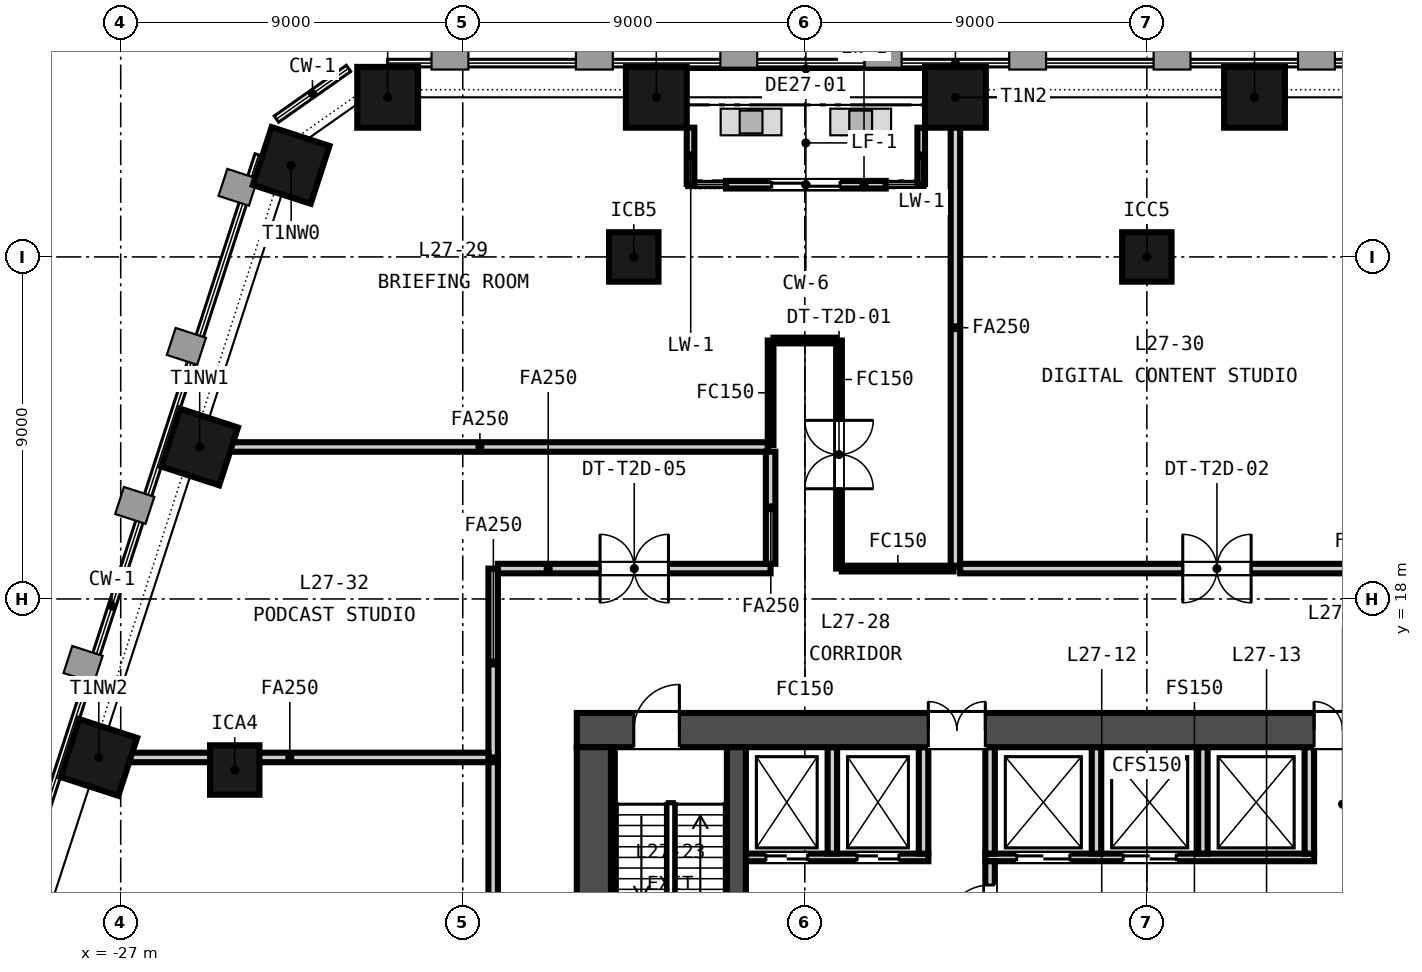
"""IFC4 building model, lengths in metres.
Left out: names, types, materials, properties, quantities, classifications, styles, units other than length and angle.
Written with IfcOpenShell. Run it as: python <this file> out.ifc"""

import sys

from ifc_helpers import new_model, si_unit, direction, frame, frame_2d, origin, origin_2d, place, context, subcontext, project, spatial, rectangle, extrude, element, fill, save


model = new_model("IFC4")
c1 = context("Model", 3, precision=1e-05, world=origin(), true_north=direction((0.0, 1.0)))
c2 = subcontext(c1, "Body", "Model", "MODEL_VIEW")
j1 = project(units=[si_unit("LENGTHUNIT", "METRE"), si_unit("PLANEANGLEUNIT", "RADIAN")], contexts=[c1])
p1 = place(None, origin())
s1 = spatial("IfcSite", under=j1, at=p1, CompositionType="ELEMENT")
p2 = place(p1, origin())
s2 = spatial("IfcBuilding", under=s1, at=p2, CompositionType="ELEMENT")
p3 = place(p2, frame((0.0, 0.0, 113.5)))
s3 = spatial("IfcBuildingStorey", under=s2, at=p3, CompositionType="ELEMENT", Elevation=113.5)
p4 = place(p3, frame((-15.0, 14.55, -0.15), z_axis=(0.0, 0.0, 1.0), x_axis=(1.0, 0.0, 0.0)))
e1 = element("IfcWall", 1, at=p4, inside=s3, PredefinedType="SOLIDWALL", context=c2, shape_type="SweptSolid", body=[
    extrude(rectangle(XDim=30.0, YDim=0.9, at=frame_2d((15.0, 0.0))), origin(), (0.0, 0.0, 1.0), 3.5),
])
p5 = place(p4, frame((9.25, 0.0, 0.15)))
e2 = element("IfcOpeningElement", 2, at=p5, cuts=e1, PredefinedType="OPENING", context=c2, shape_type="SweptSolid", body=[
    extrude(rectangle(XDim=1.5, YDim=2.1, at=frame_2d((0.75, 1.05))), frame((0.0, 0.46, 0.0), z_axis=(0.0, -1.0, 0.0), x_axis=(1.0, 0.0, 0.0)), (0.0, 0.0, 1.0), 0.92),
])
p6 = place(p4, frame((19.4, 0.0, 0.15)))
e3 = element("IfcOpeningElement", 3, at=p6, cuts=e1, PredefinedType="OPENING", context=c2, shape_type="SweptSolid", body=[
    extrude(rectangle(XDim=1.5, YDim=2.1, at=frame_2d((0.75, 1.05))), frame((0.0, 0.46, 0.0), z_axis=(0.0, -1.0, 0.0), x_axis=(1.0, 0.0, 0.0)), (0.0, 0.0, 1.0), 0.92),
])
p7 = place(p4, frame((1.5, 0.0, 0.15)))
e4 = element("IfcOpeningElement", 4, at=p7, cuts=e1, PredefinedType="OPENING", context=c2, shape_type="SweptSolid", body=[
    extrude(rectangle(XDim=1.2, YDim=2.1, at=frame_2d((0.6, 1.05))), frame((0.0, 0.46, 0.0), z_axis=(0.0, -1.0, 0.0), x_axis=(1.0, 0.0, 0.0)), (0.0, 0.0, 1.0), 0.92),
])
p8 = place(p4, frame((27.3, 0.0, 0.15)))
e5 = element("IfcOpeningElement", 5, at=p8, cuts=e1, PredefinedType="OPENING", context=c2, shape_type="SweptSolid", body=[
    extrude(rectangle(XDim=1.2, YDim=2.1, at=frame_2d((0.6, 1.05))), frame((0.0, 0.46, 0.0), z_axis=(0.0, -1.0, 0.0), x_axis=(1.0, 0.0, 0.0)), (0.0, 0.0, 1.0), 0.92),
])
p9 = place(p3, frame((-14.55, 0.9, -0.15), z_axis=(0.0, 0.0, 1.0), x_axis=(0.0, 1.0, 0.0)))
e6 = element("IfcWall", 6, at=p9, inside=s3, PredefinedType="SOLIDWALL", context=c2, shape_type="SweptSolid", body=[
    extrude(rectangle(XDim=13.2, YDim=0.9, at=frame_2d((6.6, 0.0))), origin(), (0.0, 0.0, 1.0), 3.5),
])
p10 = place(p3, frame((-10.8, 0.9, -0.15), z_axis=(0.0, 0.0, 1.0), x_axis=(0.0, 1.0, 0.0)))
e7 = element("IfcWall", 7, at=p10, inside=s3, PredefinedType="SOLIDWALL", context=c2, shape_type="SweptSolid", body=[
    extrude(rectangle(XDim=13.2, YDim=0.5, at=frame_2d((6.6, 0.0))), origin(), (0.0, 0.0, 1.0), 3.5),
])
for number, where, z_axis, x_axis in (
    (8, (2.832, 31.2, -0.15), (0.0, 0.0, 1.0), (-1.0, 0.0, 0.0)),
    (9, (-5.037, 31.2, -0.15), (0.0, 0.0, 1.0), (-1.0, 0.0, 0.0)),
    (10, (-12.907, 31.2, -0.15), (0.0, 0.0, 1.0), (-1.0, 0.0, 0.0)),
    (11, (-19.976, 31.2, -0.15), (0.0, 0.0, 1.0), (-1.0, 0.0, 0.0)),
    (12, (-22.515, 29.407, -0.15), (0.0, 0.0, 1.0), (-0.309, -0.951, 0.0)),
    (13, (-24.923, 21.999, -0.15), (0.0, 0.0, 1.0), (-0.309, -0.951, 0.0)),
    (14, (-27.577, 13.83, -0.15), (0.0, 0.0, 1.0), (-0.309, -0.951, 0.0)),
):
    element("IfcColumn", number, at=place(p3, frame(where, z_axis=z_axis, x_axis=x_axis)), inside=s3, PredefinedType="COLUMN", context=c2, shape_type="SweptSolid", body=[
        extrude(rectangle(XDim=1.6, YDim=1.6, at=origin_2d()), origin(), (0.0, 0.0, 1.0), 3.5),
    ])
for number, where, z_axis, x_axis in (
    (15, (-24.0, 13.5, -0.15), (0.0, 0.0, 1.0), (1.0, 0.0, 0.0)),
    (16, (-13.5, 27.0, -0.15), (0.0, 0.0, 1.0), (1.0, 0.0, 0.0)),
    (17, (0.0, 27.0, -0.15), (0.0, 0.0, 1.0), (1.0, 0.0, 0.0)),
):
    element("IfcColumn", number, at=place(p3, frame(where, z_axis=z_axis, x_axis=x_axis)), inside=s3, PredefinedType="COLUMN", context=c2, shape_type="SweptSolid", body=[
        extrude(rectangle(XDim=1.3, YDim=1.3, at=origin_2d()), origin(), (0.0, 0.0, 1.0), 3.5),
    ])
p11 = place(p3, frame((-6.872, 28.9, 0.0), z_axis=(0.0, 0.0, 1.0), x_axis=(-1.0, 0.0, 0.0)))
e18 = element("IfcWall", 18, at=p11, inside=s3, PredefinedType="SOLIDWALL", context=c2, shape_type="SweptSolid", body=[
    extrude(rectangle(XDim=4.2, YDim=0.2, at=frame_2d((2.1, 0.0))), origin(), (0.0, 0.0, 1.0), 2.9),
])
p12 = place(p11, frame((1.2, 0.0, 0.0)))
e19 = element("IfcOpeningElement", 19, at=p12, cuts=e18, PredefinedType="OPENING", context=c2, shape_type="SweptSolid", body=[
    extrude(rectangle(XDim=1.8, YDim=2.4, at=frame_2d((0.9, 1.2))), frame((0.0, 0.11, 0.0), z_axis=(0.0, -1.0, 0.0), x_axis=(1.0, 0.0, 0.0)), (0.0, 0.0, 1.0), 0.22),
])
for number, where, z_axis, x_axis in (
    (20, (-5.937, 30.4, 0.0), (0.0, 0.0, 1.0), (0.0, -1.0, 0.0)),
    (21, (-12.007, 30.4, 0.0), (0.0, 0.0, 1.0), (0.0, -1.0, 0.0)),
):
    element("IfcWall", number, at=place(p3, frame(where, z_axis=z_axis, x_axis=x_axis)), inside=s3, PredefinedType="SOLIDWALL", context=c2, shape_type="SweptSolid", body=[
        extrude(rectangle(XDim=1.484, YDim=0.2, at=frame_2d((0.742, 0.0))), origin(), (0.0, 0.0, 1.0), 2.9),
    ])
p13 = place(p3, frame((-10.55, 11.2, 0.0), z_axis=(0.0, 0.0, 1.0), x_axis=(1.0, 0.0, 0.0)))
e22 = element("IfcWall", 22, at=p13, inside=s3, PredefinedType="PARTITIONING", context=c2, shape_type="SweptSolid", body=[
    extrude(rectangle(XDim=4.8, YDim=0.2, at=frame_2d((2.4, 0.0))), origin(), (0.0, 0.0, 1.0), 3.35),
])
p14 = place(p13, frame((0.525, 0.0, 0.0)))
e23 = element("IfcOpeningElement", 23, at=p14, cuts=e22, PredefinedType="OPENING", context=c2, shape_type="SweptSolid", body=[
    extrude(rectangle(XDim=1.1, YDim=2.1, at=frame_2d((0.55, 1.05))), frame((0.0, 0.11, 0.0), z_axis=(0.0, -1.0, 0.0), x_axis=(1.0, 0.0, 0.0)), (0.0, 0.0, 1.0), 0.22),
])
p15 = place(p13, frame((2.925, 0.0, 0.0)))
e24 = element("IfcOpeningElement", 24, at=p15, cuts=e22, PredefinedType="OPENING", context=c2, shape_type="SweptSolid", body=[
    extrude(rectangle(XDim=1.1, YDim=2.1, at=frame_2d((0.55, 1.05))), frame((0.0, 0.11, 0.0), z_axis=(0.0, -1.0, 0.0), x_axis=(1.0, 0.0, 0.0)), (0.0, 0.0, 1.0), 0.22),
])
p16 = place(p3, frame((-4.25, 11.2, 0.0), z_axis=(0.0, 0.0, 1.0), x_axis=(1.0, 0.0, 0.0)))
e25 = element("IfcWall", 25, at=p16, inside=s3, PredefinedType="PARTITIONING", context=c2, shape_type="SweptSolid", body=[
    extrude(rectangle(XDim=8.65, YDim=0.2, at=frame_2d((4.325, 0.0))), origin(), (0.0, 0.0, 1.0), 3.35),
])
p17 = place(p16, frame((0.825, 0.0, 0.0)))
e26 = element("IfcOpeningElement", 26, at=p17, cuts=e25, PredefinedType="OPENING", context=c2, shape_type="SweptSolid", body=[
    extrude(rectangle(XDim=1.4, YDim=2.1, at=frame_2d((0.7, 1.05))), frame((0.0, 0.11, 0.0), z_axis=(0.0, -1.0, 0.0), x_axis=(1.0, 0.0, 0.0)), (0.0, 0.0, 1.0), 0.22),
])
p18 = place(p16, frame((3.625, 0.0, 0.0)))
e27 = element("IfcOpeningElement", 27, at=p18, cuts=e25, PredefinedType="OPENING", context=c2, shape_type="SweptSolid", body=[
    extrude(rectangle(XDim=1.4, YDim=2.1, at=frame_2d((0.7, 1.05))), frame((0.0, 0.11, 0.0), z_axis=(0.0, -1.0, 0.0), x_axis=(1.0, 0.0, 0.0)), (0.0, 0.0, 1.0), 0.22),
])
p19 = place(p3, frame((-4.125, 6.15, 0.0), z_axis=(0.0, 0.0, 1.0), x_axis=(0.0, 1.0, 0.0)))
e28 = element("IfcWall", 28, at=p19, inside=s3, PredefinedType="PARTITIONING", context=c2, shape_type="SweptSolid", body=[
    extrude(rectangle(XDim=4.95, YDim=0.25, at=frame_2d((2.475, 0.0))), origin(), (0.0, 0.0, 1.0), 3.35),
])
p20 = place(p19, frame((3.125, 0.0, 0.0)))
e29 = element("IfcOpeningElement", 29, at=p20, cuts=e28, PredefinedType="OPENING", context=c2, shape_type="SweptSolid", body=[
    extrude(rectangle(XDim=1.2, YDim=2.1, at=frame_2d((0.6, 1.05))), frame((0.0, 0.135, 0.0), z_axis=(0.0, -1.0, 0.0), x_axis=(1.0, 0.0, 0.0)), (0.0, 0.0, 1.0), 0.27),
])
for number, where, z_axis, x_axis in (
    (30, (-8.275, 11.3, 0.0), (0.0, 0.0, 1.0), (0.0, 1.0, 0.0)),
    (31, (-5.875, 11.3, 0.0), (0.0, 0.0, 1.0), (0.0, 1.0, 0.0)),
    (32, (-4.125, 11.3, 0.0), (0.0, 0.0, 1.0), (0.0, 1.0, 0.0)),
    (33, (-1.325, 11.3, 0.0), (0.0, 0.0, 1.0), (0.0, 1.0, 0.0)),
    (34, (1.475, 11.3, 0.0), (0.0, 0.0, 1.0), (0.0, 1.0, 0.0)),
    (35, (4.275, 11.3, 0.0), (0.0, 0.0, 1.0), (0.0, 1.0, 0.0)),
):
    element("IfcWall", number, at=place(p3, frame(where, z_axis=z_axis, x_axis=x_axis)), inside=s3, PredefinedType="PARTITIONING", context=c2, shape_type="SweptSolid", body=[
        extrude(rectangle(XDim=2.8, YDim=0.25, at=frame_2d((1.4, 0.0))), origin(), (0.0, 0.0, 1.0), 3.35),
    ])
p21 = place(p3, frame((-14.05, 0.9, 0.0), z_axis=(0.0, 0.0, 1.0), x_axis=(0.0, 1.0, 0.0)))
e36 = element("IfcWall", 36, at=p21, inside=s3, PredefinedType="SOLIDWALL", context=c2, shape_type="SweptSolid", body=[
    extrude(rectangle(XDim=13.2, YDim=0.1, at=frame_2d((6.6, 0.0))), origin(), (0.0, 0.0, 1.0), 3.35),
])
p22 = place(p3, frame((-8.1, 24.8, 0.0), z_axis=(0.0, 0.0, 1.0), x_axis=(0.0, -1.0, 0.0)))
e37 = element("IfcWall", 37, at=p22, inside=s3, PredefinedType="PARTITIONING", context=c2, shape_type="SweptSolid", body=[
    extrude(rectangle(XDim=6.0, YDim=0.15, at=frame_2d((3.0, 0.0))), origin(), (0.0, 0.0, 1.0), 2.591),
])
p23 = place(p22, frame((2.1, 0.0, 0.0)))
e38 = element("IfcOpeningElement", 38, at=p23, cuts=e37, PredefinedType="OPENING", context=c2, shape_type="SweptSolid", body=[
    extrude(rectangle(XDim=1.8, YDim=2.1, at=frame_2d((0.9, 1.05))), frame((0.0, 0.085, 0.0), z_axis=(0.0, -1.0, 0.0), x_axis=(1.0, 0.0, 0.0)), (0.0, 0.0, 1.0), 0.17),
])
p24 = place(p3, frame((-9.9, 22.049, 0.0), z_axis=(0.0, 0.0, 1.0), x_axis=(0.0, 1.0, 0.0)))
e39 = element("IfcWall", 39, at=p24, inside=s3, PredefinedType="PARTITIONING", context=c2, shape_type="SweptSolid", body=[
    extrude(rectangle(XDim=2.751, YDim=0.15, at=frame_2d((1.375, 0.0))), origin(), (0.0, 0.0, 1.0), 2.591),
])
p25 = place(p3, frame((-9.825, 24.8, 0.0), z_axis=(0.0, 0.0, 1.0), x_axis=(1.0, 0.0, 0.0)))
e40 = element("IfcWall", 40, at=p25, inside=s3, PredefinedType="PARTITIONING", context=c2, shape_type="SweptSolid", body=[
    extrude(rectangle(XDim=1.65, YDim=0.15, at=frame_2d((0.825, 0.0))), origin(), (0.0, 0.0, 1.0), 2.591),
])
p26 = place(p3, frame((-8.025, 18.8, 0.0), z_axis=(0.0, 0.0, 1.0), x_axis=(1.0, 0.0, 0.0)))
e41 = element("IfcWall", 41, at=p26, inside=s3, PredefinedType="PARTITIONING", context=c2, shape_type="SweptSolid", body=[
    extrude(rectangle(XDim=2.938, YDim=0.15, at=frame_2d((1.469, 0.0))), origin(), (0.0, 0.0, 1.0), 2.591),
])
p27 = place(p3, frame((-5.037, 18.875, 0.0), z_axis=(0.0, 0.0, 1.0), x_axis=(0.0, 1.0, 0.0)))
e42 = element("IfcWall", 42, at=p27, inside=s3, PredefinedType="PARTITIONING", context=c2, shape_type="SweptSolid", body=[
    extrude(rectangle(XDim=12.525, YDim=0.25, at=frame_2d((6.262, 0.0))), origin(), (0.0, 0.0, 1.0), 2.591),
])
p28 = place(p3, frame((-25.133, 21.999, 0.0), z_axis=(0.0, 0.0, 1.0), x_axis=(1.0, 0.0, 0.0)))
e43 = element("IfcWall", 43, at=p28, inside=s3, PredefinedType="PARTITIONING", context=c2, shape_type="SweptSolid", body=[
    extrude(rectangle(XDim=15.158, YDim=0.25, at=frame_2d((7.579, 0.0))), origin(), (0.0, 0.0, 1.0), 2.591),
])
p29 = place(p3, frame((-4.912, 18.8, 0.0), z_axis=(0.0, 0.0, 1.0), x_axis=(1.0, 0.0, 0.0)))
e44 = element("IfcWall", 44, at=p29, inside=s3, PredefinedType="PARTITIONING", context=c2, shape_type="SweptSolid", body=[
    extrude(rectangle(XDim=13.512, YDim=0.25, at=frame_2d((6.756, 0.0))), origin(), (0.0, 0.0, 1.0), 2.591),
])
p30 = place(p29, frame((5.856, 0.0, 0.0)))
e45 = element("IfcOpeningElement", 45, at=p30, cuts=e44, PredefinedType="OPENING", context=c2, shape_type="SweptSolid", body=[
    extrude(rectangle(XDim=1.8, YDim=2.1, at=frame_2d((0.9, 1.05))), frame((0.0, 0.135, 0.0), z_axis=(0.0, -1.0, 0.0), x_axis=(1.0, 0.0, 0.0)), (0.0, 0.0, 1.0), 0.27),
])
p31 = place(p3, frame((-17.2, 13.83, 0.0), z_axis=(0.0, 0.0, 1.0), x_axis=(0.0, 1.0, 0.0)))
e46 = element("IfcWall", 46, at=p31, inside=s3, PredefinedType="PARTITIONING", context=c2, shape_type="SweptSolid", body=[
    extrude(rectangle(XDim=4.97, YDim=0.25, at=frame_2d((2.485, 0.0))), origin(), (0.0, 0.0, 1.0), 2.591),
])
p32 = place(p3, frame((-17.075, 18.8, 0.0), z_axis=(0.0, 0.0, 1.0), x_axis=(1.0, 0.0, 0.0)))
e47 = element("IfcWall", 47, at=p32, inside=s3, PredefinedType="PARTITIONING", context=c2, shape_type="SweptSolid", body=[
    extrude(rectangle(XDim=7.175, YDim=0.25, at=frame_2d((3.587, 0.0))), origin(), (0.0, 0.0, 1.0), 2.591),
])
p33 = place(p32, frame((2.688, 0.0, 0.0)))
e48 = element("IfcOpeningElement", 48, at=p33, cuts=e47, PredefinedType="OPENING", context=c2, shape_type="SweptSolid", body=[
    extrude(rectangle(XDim=1.8, YDim=2.1, at=frame_2d((0.9, 1.05))), frame((0.0, 0.135, 0.0), z_axis=(0.0, -1.0, 0.0), x_axis=(1.0, 0.0, 0.0)), (0.0, 0.0, 1.0), 0.27),
])
p34 = place(p3, frame((-9.9, 18.925, 0.0), z_axis=(0.0, 0.0, 1.0), x_axis=(0.0, 1.0, 0.0)))
e49 = element("IfcWall", 49, at=p34, inside=s3, PredefinedType="PARTITIONING", context=c2, shape_type="SweptSolid", body=[
    extrude(rectangle(XDim=2.949, YDim=0.25, at=frame_2d((1.475, 0.0))), origin(), (0.0, 0.0, 1.0), 2.591),
])
p35 = place(p3, frame((-27.787, 13.83, 0.0), z_axis=(0.0, 0.0, 1.0), x_axis=(1.0, 0.0, 0.0)))
e50 = element("IfcWall", 50, at=p35, inside=s3, PredefinedType="PARTITIONING", context=c2, shape_type="SweptSolid", body=[
    extrude(rectangle(XDim=10.462, YDim=0.25, at=frame_2d((5.231, 0.0))), origin(), (0.0, 0.0, 1.0), 2.591),
])
p36 = place(p3, frame((-17.2, 4.325, 0.0), z_axis=(0.0, 0.0, 1.0), x_axis=(0.0, 1.0, 0.0)))
e51 = element("IfcWall", 51, at=p36, inside=s3, PredefinedType="PARTITIONING", context=c2, shape_type="SweptSolid", body=[
    extrude(rectangle(XDim=9.38, YDim=0.25, at=frame_2d((4.69, 0.0))), origin(), (0.0, 0.0, 1.0), 2.591),
])
p37 = place(p12, origin())
e52 = element("IfcDoor", 52, at=p37, inside=s3, OperationType="SINGLE_SWING_LEFT", PredefinedType="DOOR", context=c2, shape_type="SweptSolid", body=[
    extrude(rectangle(XDim=1.8, YDim=2.4, at=frame_2d((0.9, 1.2))), frame((0.0, 0.025, 0.0), z_axis=(0.0, -1.0, 0.0), x_axis=(1.0, 0.0, 0.0)), (0.0, 0.0, 1.0), 0.05),
])
fill(e19, e52)
p38 = place(p20, origin())
e53 = element("IfcDoor", 53, at=p38, inside=s3, OperationType="SINGLE_SWING_LEFT", PredefinedType="DOOR", context=c2, shape_type="SweptSolid", body=[
    extrude(rectangle(XDim=1.2, YDim=2.1, at=frame_2d((0.6, 1.05))), frame((0.0, 0.025, 0.0), z_axis=(0.0, -1.0, 0.0), x_axis=(1.0, 0.0, 0.0)), (0.0, 0.0, 1.0), 0.05),
])
fill(e29, e53)
p39 = place(p14, origin())
e54 = element("IfcDoor", 54, at=p39, inside=s3, OperationType="DOUBLE_DOOR_SLIDING", PredefinedType="DOOR", context=c2, shape_type="SweptSolid", body=[
    extrude(rectangle(XDim=1.1, YDim=2.1, at=frame_2d((0.55, 1.05))), frame((0.0, 0.025, 0.0), z_axis=(0.0, -1.0, 0.0), x_axis=(1.0, 0.0, 0.0)), (0.0, 0.0, 1.0), 0.05),
])
fill(e23, e54)
p40 = place(p15, origin())
e55 = element("IfcDoor", 55, at=p40, inside=s3, OperationType="DOUBLE_DOOR_SLIDING", PredefinedType="DOOR", context=c2, shape_type="SweptSolid", body=[
    extrude(rectangle(XDim=1.1, YDim=2.1, at=frame_2d((0.55, 1.05))), frame((0.0, 0.025, 0.0), z_axis=(0.0, -1.0, 0.0), x_axis=(1.0, 0.0, 0.0)), (0.0, 0.0, 1.0), 0.05),
])
fill(e24, e55)
p41 = place(p17, origin())
e56 = element("IfcDoor", 56, at=p41, inside=s3, OperationType="DOUBLE_DOOR_SLIDING", PredefinedType="DOOR", context=c2, shape_type="SweptSolid", body=[
    extrude(rectangle(XDim=1.4, YDim=2.1, at=frame_2d((0.7, 1.05))), frame((0.0, 0.025, 0.0), z_axis=(0.0, -1.0, 0.0), x_axis=(1.0, 0.0, 0.0)), (0.0, 0.0, 1.0), 0.05),
])
fill(e26, e56)
p42 = place(p18, origin())
e57 = element("IfcDoor", 57, at=p42, inside=s3, OperationType="DOUBLE_DOOR_SLIDING", PredefinedType="DOOR", context=c2, shape_type="SweptSolid", body=[
    extrude(rectangle(XDim=1.4, YDim=2.1, at=frame_2d((0.7, 1.05))), frame((0.0, 0.025, 0.0), z_axis=(0.0, -1.0, 0.0), x_axis=(1.0, 0.0, 0.0)), (0.0, 0.0, 1.0), 0.05),
])
fill(e27, e57)
p43 = place(p5, origin())
e58 = element("IfcDoor", 58, at=p43, inside=s3, OperationType="DOUBLE_DOOR_SINGLE_SWING", PredefinedType="DOOR", context=c2, shape_type="SweptSolid", body=[
    extrude(rectangle(XDim=1.5, YDim=2.1, at=frame_2d((0.75, 1.05))), frame((0.0, 0.025, 0.0), z_axis=(0.0, -1.0, 0.0), x_axis=(1.0, 0.0, 0.0)), (0.0, 0.0, 1.0), 0.05),
])
fill(e2, e58)
p44 = place(p6, origin())
e59 = element("IfcDoor", 59, at=p44, inside=s3, OperationType="DOUBLE_DOOR_SINGLE_SWING", PredefinedType="DOOR", context=c2, shape_type="SweptSolid", body=[
    extrude(rectangle(XDim=1.5, YDim=2.1, at=frame_2d((0.75, 1.05))), frame((0.0, 0.025, 0.0), z_axis=(0.0, -1.0, 0.0), x_axis=(1.0, 0.0, 0.0)), (0.0, 0.0, 1.0), 0.05),
])
fill(e3, e59)
p45 = place(p7, origin())
e60 = element("IfcDoor", 60, at=p45, inside=s3, OperationType="SINGLE_SWING_RIGHT", PredefinedType="DOOR", context=c2, shape_type="SweptSolid", body=[
    extrude(rectangle(XDim=1.2, YDim=2.1, at=frame_2d((0.6, 1.05))), frame((0.0, 0.025, 0.0), z_axis=(0.0, -1.0, 0.0), x_axis=(1.0, 0.0, 0.0)), (0.0, 0.0, 1.0), 0.05),
])
fill(e4, e60)
p46 = place(p23, origin())
e61 = element("IfcDoor", 61, at=p46, inside=s3, OperationType="DOUBLE_DOOR_DOUBLE_SWING", PredefinedType="DOOR", context=c2, shape_type="SweptSolid", body=[
    extrude(rectangle(XDim=1.8, YDim=2.1, at=frame_2d((0.9, 1.05))), frame((0.0, 0.025, 0.0), z_axis=(0.0, -1.0, 0.0), x_axis=(1.0, 0.0, 0.0)), (0.0, 0.0, 1.0), 0.05),
])
fill(e38, e61)
p47 = place(p30, origin())
e62 = element("IfcDoor", 62, at=p47, inside=s3, OperationType="DOUBLE_DOOR_DOUBLE_SWING", PredefinedType="DOOR", context=c2, shape_type="SweptSolid", body=[
    extrude(rectangle(XDim=1.8, YDim=2.1, at=frame_2d((0.9, 1.05))), frame((0.0, 0.025, 0.0), z_axis=(0.0, -1.0, 0.0), x_axis=(1.0, 0.0, 0.0)), (0.0, 0.0, 1.0), 0.05),
])
fill(e45, e62)
p48 = place(p33, origin())
e63 = element("IfcDoor", 63, at=p48, inside=s3, OperationType="DOUBLE_DOOR_DOUBLE_SWING", PredefinedType="DOOR", context=c2, shape_type="SweptSolid", body=[
    extrude(rectangle(XDim=1.8, YDim=2.1, at=frame_2d((0.9, 1.05))), frame((0.0, 0.025, 0.0), z_axis=(0.0, -1.0, 0.0), x_axis=(1.0, 0.0, 0.0)), (0.0, 0.0, 1.0), 0.05),
])
fill(e48, e63)
save(model, sys.argv[1])
